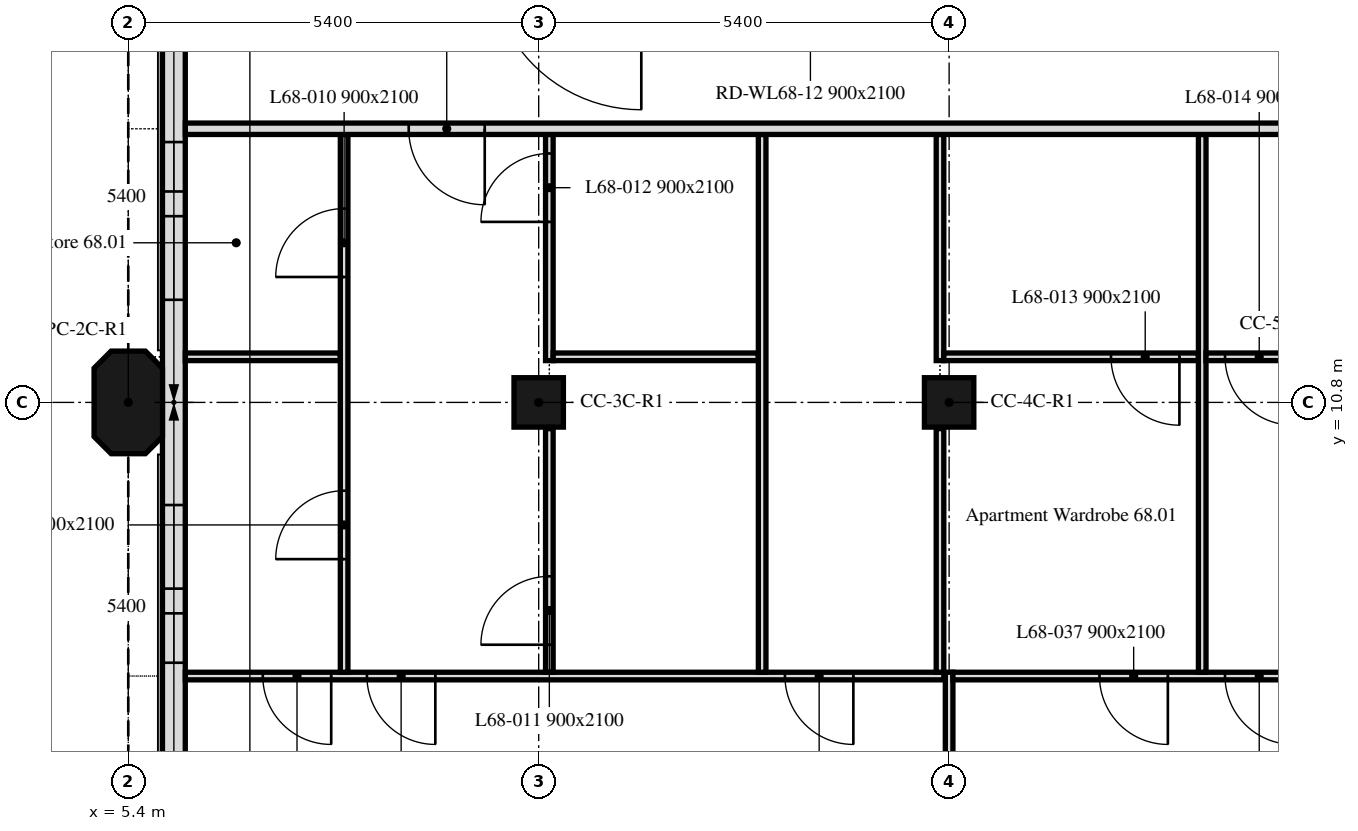
"""IFC4 building model, lengths in metres.
Left out: names, types, materials, properties, quantities, classifications, styles, units other than length and angle.
Written with IfcOpenShell. Run it as: python <this file> out.ifc"""

import sys

from ifc_helpers import new_model, si_unit, direction, frame, frame_2d, origin, origin_2d, place, context, subcontext, project, spatial, polyline, rectangle, outline, extrude, element, fill, save


model = new_model("IFC4")
c1 = context("Model", 3, precision=1e-05, world=origin(), true_north=direction((0.0, 1.0)))
c2 = subcontext(c1, "Body", "Model", "MODEL_VIEW")
j1 = project(units=[si_unit("LENGTHUNIT", "METRE"), si_unit("PLANEANGLEUNIT", "RADIAN")], contexts=[c1])
p1 = place(None, origin())
s1 = spatial("IfcSite", under=j1, at=p1, CompositionType="ELEMENT")
p2 = place(p1, origin())
s2 = spatial("IfcBuilding", under=s1, at=p2, CompositionType="ELEMENT")
p3 = place(p2, frame((0.0, 0.0, 278.5)))
s3 = spatial("IfcBuildingStorey", under=s2, at=p3, CompositionType="ELEMENT", Elevation=278.5)
p4 = place(p3, frame((5.4, 10.8, 0.0), z_axis=(0.0, 0.0, 1.0), x_axis=(0.0, 1.0, 0.0)))
e1 = element("IfcColumn", 1, at=p4, inside=s3, PredefinedType="COLUMN", context=c2, shape_type="SweptSolid", body=[
    extrude(outline(polyline([(-0.45, -0.45), (0.45, -0.45), (0.675, -0.225), (0.675, 0.225), (0.45, 0.45), (-0.45, 0.45), (-0.675, 0.225), (-0.675, -0.225), (-0.45, -0.45)])), origin(), (0.0, 0.0, 1.0), 3.0),
])
for number, where, z_axis, x_axis in (
    (2, (10.8, 10.8, 0.0), (0.0, 0.0, 1.0), (1.0, 0.0, 0.0)),
    (3, (16.2, 10.8, 0.0), (0.0, 0.0, 1.0), (1.0, 0.0, 0.0)),
):
    element("IfcColumn", number, at=place(p3, frame(where, z_axis=z_axis, x_axis=x_axis)), inside=s3, PredefinedType="COLUMN", context=c2, shape_type="SweptSolid", body=[
        extrude(rectangle(XDim=0.65, YDim=0.65, at=origin_2d()), origin(), (0.0, 0.0, 1.0), 3.0),
    ])
p5 = place(p3, frame((6.0, 16.2, 0.0), z_axis=(0.0, 0.0, 1.0), x_axis=(0.0, -1.0, 0.0)))
e4 = element("IfcWall", 4, at=p5, inside=s3, PredefinedType="SOLIDWALL", context=c2, shape_type="SweptSolid", body=[
    extrude(rectangle(XDim=10.614, YDim=0.3, at=frame_2d((5.307, 0.0))), origin(), (0.0, 0.0, 1.0), 3.0),
])
p6 = place(p5, frame((1.975, 0.0, 0.9)))
e5 = element("IfcOpeningElement", 5, at=p6, cuts=e4, PredefinedType="OPENING", context=c2, shape_type="SweptSolid", body=[
    extrude(rectangle(XDim=0.65, YDim=1.7, at=frame_2d((0.325, 0.85))), frame((0.0, 0.16, 0.0), z_axis=(0.0, -1.0, 0.0), x_axis=(1.0, 0.0, 0.0)), (0.0, 0.0, 1.0), 0.32),
])
p7 = place(p5, frame((2.95, 0.0, 0.9)))
e6 = element("IfcOpeningElement", 6, at=p7, cuts=e4, PredefinedType="OPENING", context=c2, shape_type="SweptSolid", body=[
    extrude(rectangle(XDim=1.1, YDim=1.7, at=frame_2d((0.55, 0.85))), frame((0.0, 0.16, 0.0), z_axis=(0.0, -1.0, 0.0), x_axis=(1.0, 0.0, 0.0)), (0.0, 0.0, 1.0), 0.32),
])
p8 = place(p5, frame((6.75, 0.0, 0.9)))
e7 = element("IfcOpeningElement", 7, at=p8, cuts=e4, PredefinedType="OPENING", context=c2, shape_type="SweptSolid", body=[
    extrude(rectangle(XDim=1.1, YDim=1.7, at=frame_2d((0.55, 0.85))), frame((0.0, 0.16, 0.0), z_axis=(0.0, -1.0, 0.0), x_axis=(1.0, 0.0, 0.0)), (0.0, 0.0, 1.0), 0.32),
])
p9 = place(p5, frame((8.175, 0.0, 0.9)))
e8 = element("IfcOpeningElement", 8, at=p9, cuts=e4, PredefinedType="OPENING", context=c2, shape_type="SweptSolid", body=[
    extrude(rectangle(XDim=0.65, YDim=1.7, at=frame_2d((0.325, 0.85))), frame((0.0, 0.16, 0.0), z_axis=(0.0, -1.0, 0.0), x_axis=(1.0, 0.0, 0.0)), (0.0, 0.0, 1.0), 0.32),
])
p10 = place(p3, frame((16.2, 5.745, 0.0), z_axis=(0.0, 0.0, 1.0), x_axis=(0.0, 1.0, 0.0)))
e9 = element("IfcWall", 9, at=p10, inside=s3, PredefinedType="PARTITIONING", context=c2, shape_type="SweptSolid", body=[
    extrude(rectangle(XDim=1.505, YDim=0.1, at=frame_2d((0.752, 0.0))), origin(), (0.0, 0.0, 1.0), 2.4),
])
p11 = place(p3, frame((16.13, 7.2, 0.0), z_axis=(0.0, 0.0, 1.0), x_axis=(-1.0, 0.0, 0.0)))
e10 = element("IfcWall", 10, at=p11, inside=s3, PredefinedType="PARTITIONING", context=c2, shape_type="SweptSolid", body=[
    extrude(rectangle(XDim=9.979, YDim=0.1, at=frame_2d((4.99, 0.0))), origin(), (0.0, 0.0, 1.0), 3.0),
])
p12 = place(p11, frame((1.19, 0.0, 0.0)))
e11 = element("IfcOpeningElement", 11, at=p12, cuts=e10, PredefinedType="OPENING", context=c2, shape_type="SweptSolid", body=[
    extrude(rectangle(XDim=0.9, YDim=2.1, at=frame_2d((0.45, 1.05))), frame((0.0, 0.05, 0.0), z_axis=(0.0, -1.0, 0.0), x_axis=(1.0, 0.0, 0.0)), (0.0, 0.0, 1.0), 0.1),
])
p13 = place(p11, frame((8.06, 0.0, 0.0)))
e12 = element("IfcOpeningElement", 12, at=p13, cuts=e10, PredefinedType="OPENING", context=c2, shape_type="SweptSolid", body=[
    extrude(rectangle(XDim=0.9, YDim=2.1, at=frame_2d((0.45, 1.05))), frame((0.0, 0.05, 0.0), z_axis=(0.0, -1.0, 0.0), x_axis=(1.0, 0.0, 0.0)), (0.0, 0.0, 1.0), 0.1),
])
p14 = place(p11, frame((6.69, 0.0, 0.0)))
e13 = element("IfcOpeningElement", 13, at=p14, cuts=e10, PredefinedType="OPENING", context=c2, shape_type="SweptSolid", body=[
    extrude(rectangle(XDim=0.9, YDim=2.1, at=frame_2d((0.45, 1.05))), frame((0.0, 0.05, 0.0), z_axis=(0.0, -1.0, 0.0), x_axis=(1.0, 0.0, 0.0)), (0.0, 0.0, 1.0), 0.1),
])
p15 = place(p3, frame((21.525, 7.2, 0.0), z_axis=(0.0, 0.0, 1.0), x_axis=(-1.0, 0.0, 0.0)))
e14 = element("IfcWall", 14, at=p15, inside=s3, PredefinedType="PARTITIONING", context=c2, shape_type="SweptSolid", body=[
    extrude(rectangle(XDim=5.275, YDim=0.1, at=frame_2d((2.637, 0.0))), origin(), (0.0, 0.0, 1.0), 3.0),
])
p16 = place(p15, frame((2.447, 0.0, 0.0)))
e15 = element("IfcOpeningElement", 15, at=p16, cuts=e14, PredefinedType="OPENING", context=c2, shape_type="SweptSolid", body=[
    extrude(rectangle(XDim=0.9, YDim=2.1, at=frame_2d((0.45, 1.05))), frame((0.0, 0.05, 0.0), z_axis=(0.0, -1.0, 0.0), x_axis=(1.0, 0.0, 0.0)), (0.0, 0.0, 1.0), 0.1),
])
p17 = place(p15, frame((0.795, 0.0, 0.0)))
e16 = element("IfcOpeningElement", 16, at=p17, cuts=e14, PredefinedType="OPENING", context=c2, shape_type="SweptSolid", body=[
    extrude(rectangle(XDim=0.9, YDim=2.1, at=frame_2d((0.45, 1.05))), frame((0.0, 0.05, 0.0), z_axis=(0.0, -1.0, 0.0), x_axis=(1.0, 0.0, 0.0)), (0.0, 0.0, 1.0), 0.1),
])
p18 = place(p3, frame((8.19, 11.4, 0.0), z_axis=(0.0, 0.0, 1.0), x_axis=(-1.0, 0.0, 0.0)))
e17 = element("IfcWall", 17, at=p18, inside=s3, PredefinedType="PARTITIONING", context=c2, shape_type="SweptSolid", body=[
    extrude(rectangle(XDim=2.039, YDim=0.1, at=frame_2d((1.02, 0.0))), origin(), (0.0, 0.0, 1.0), 3.0),
])
p19 = place(p3, frame((8.24, 7.25, 0.0), z_axis=(0.0, 0.0, 1.0), x_axis=(0.0, 1.0, 0.0)))
e18 = element("IfcWall", 18, at=p19, inside=s3, PredefinedType="PARTITIONING", context=c2, shape_type="SweptSolid", body=[
    extrude(rectangle(XDim=7.075, YDim=0.1, at=frame_2d((3.538, 0.0))), origin(), (0.0, 0.0, 1.0), 3.0),
])
p20 = place(p19, frame((5.2, 0.0, 0.0)))
e19 = element("IfcOpeningElement", 19, at=p20, cuts=e18, PredefinedType="OPENING", context=c2, shape_type="SweptSolid", body=[
    extrude(rectangle(XDim=0.9, YDim=2.1, at=frame_2d((0.45, 1.05))), frame((0.0, 0.05, 0.0), z_axis=(0.0, -1.0, 0.0), x_axis=(1.0, 0.0, 0.0)), (0.0, 0.0, 1.0), 0.1),
])
p21 = place(p19, frame((1.488, 0.0, 0.0)))
e20 = element("IfcOpeningElement", 20, at=p21, cuts=e18, PredefinedType="OPENING", context=c2, shape_type="SweptSolid", body=[
    extrude(rectangle(XDim=0.9, YDim=2.1, at=frame_2d((0.45, 1.05))), frame((0.0, 0.05, 0.0), z_axis=(0.0, -1.0, 0.0), x_axis=(1.0, 0.0, 0.0)), (0.0, 0.0, 1.0), 0.1),
])
p22 = place(p3, frame((10.94, 7.25, 0.0), z_axis=(0.0, 0.0, 1.0), x_axis=(0.0, 1.0, 0.0)))
e21 = element("IfcWall", 21, at=p22, inside=s3, PredefinedType="PARTITIONING", context=c2, shape_type="SweptSolid", body=[
    extrude(rectangle(XDim=3.205, YDim=0.1, at=frame_2d((1.603, 0.0))), origin(), (0.0, 0.0, 1.0), 3.0),
])
p23 = place(p22, frame((0.362, 0.0, 0.0)))
e22 = element("IfcOpeningElement", 22, at=p23, cuts=e21, PredefinedType="OPENING", context=c2, shape_type="SweptSolid", body=[
    extrude(rectangle(XDim=0.9, YDim=2.1, at=frame_2d((0.45, 1.05))), frame((0.0, 0.05, 0.0), z_axis=(0.0, -1.0, 0.0), x_axis=(1.0, 0.0, 0.0)), (0.0, 0.0, 1.0), 0.1),
])
p24 = place(p3, frame((10.94, 11.35, 0.0), z_axis=(0.0, 0.0, 1.0), x_axis=(0.0, 1.0, 0.0)))
e23 = element("IfcWall", 23, at=p24, inside=s3, PredefinedType="PARTITIONING", context=c2, shape_type="SweptSolid", body=[
    extrude(rectangle(XDim=2.975, YDim=0.1, at=frame_2d((1.487, 0.0))), origin(), (0.0, 0.0, 1.0), 3.0),
])
p25 = place(p24, frame((1.825, 0.0, 0.0)))
e24 = element("IfcOpeningElement", 24, at=p25, cuts=e23, PredefinedType="OPENING", context=c2, shape_type="SweptSolid", body=[
    extrude(rectangle(XDim=0.9, YDim=2.1, at=frame_2d((0.45, 1.05))), frame((0.0, 0.05, 0.0), z_axis=(0.0, -1.0, 0.0), x_axis=(1.0, 0.0, 0.0)), (0.0, 0.0, 1.0), 0.1),
])
p26 = place(p3, frame((13.69, 11.4, 0.0), z_axis=(0.0, 0.0, 1.0), x_axis=(-1.0, 0.0, 0.0)))
e25 = element("IfcWall", 25, at=p26, inside=s3, PredefinedType="PARTITIONING", context=c2, shape_type="SweptSolid", body=[
    extrude(rectangle(XDim=2.7, YDim=0.1, at=frame_2d((1.35, 0.0))), origin(), (0.0, 0.0, 1.0), 3.0),
])
p27 = place(p3, frame((13.74, 7.25, 0.0), z_axis=(0.0, 0.0, 1.0), x_axis=(0.0, 1.0, 0.0)))
e26 = element("IfcWall", 26, at=p27, inside=s3, PredefinedType="PARTITIONING", context=c2, shape_type="SweptSolid", body=[
    extrude(rectangle(XDim=7.075, YDim=0.1, at=frame_2d((3.538, 0.0))), origin(), (0.0, 0.0, 1.0), 3.0),
])
p28 = place(p3, frame((16.08, 7.25, 0.0), z_axis=(0.0, 0.0, 1.0), x_axis=(0.0, 1.0, 0.0)))
e27 = element("IfcWall", 27, at=p28, inside=s3, PredefinedType="PARTITIONING", context=c2, shape_type="SweptSolid", body=[
    extrude(rectangle(XDim=3.205, YDim=0.1, at=frame_2d((1.603, 0.0))), origin(), (0.0, 0.0, 1.0), 2.4),
])
p29 = place(p3, frame((16.08, 11.35, 0.0), z_axis=(0.0, 0.0, 1.0), x_axis=(0.0, 1.0, 0.0)))
e28 = element("IfcWall", 28, at=p29, inside=s3, PredefinedType="PARTITIONING", context=c2, shape_type="SweptSolid", body=[
    extrude(rectangle(XDim=2.975, YDim=0.1, at=frame_2d((1.487, 0.0))), origin(), (0.0, 0.0, 1.0), 2.4),
])
p30 = place(p3, frame((19.48, 11.4, 0.0), z_axis=(0.0, 0.0, 1.0), x_axis=(-1.0, 0.0, 0.0)))
e29 = element("IfcWall", 29, at=p30, inside=s3, PredefinedType="PARTITIONING", context=c2, shape_type="SweptSolid", body=[
    extrude(rectangle(XDim=3.35, YDim=0.1, at=frame_2d((1.675, 0.0))), origin(), (0.0, 0.0, 1.0), 3.0),
])
p31 = place(p30, frame((0.25, 0.0, 0.0)))
e30 = element("IfcOpeningElement", 30, at=p31, cuts=e29, PredefinedType="OPENING", context=c2, shape_type="SweptSolid", body=[
    extrude(rectangle(XDim=0.9, YDim=2.1, at=frame_2d((0.45, 1.05))), frame((0.0, 0.05, 0.0), z_axis=(0.0, -1.0, 0.0), x_axis=(1.0, 0.0, 0.0)), (0.0, 0.0, 1.0), 0.1),
])
p32 = place(p3, frame((19.53, 7.25, 0.0), z_axis=(0.0, 0.0, 1.0), x_axis=(0.0, 1.0, 0.0)))
e31 = element("IfcWall", 31, at=p32, inside=s3, PredefinedType="PARTITIONING", context=c2, shape_type="SweptSolid", body=[
    extrude(rectangle(XDim=7.075, YDim=0.1, at=frame_2d((3.538, 0.0))), origin(), (0.0, 0.0, 1.0), 3.0),
])
p33 = place(p3, frame((23.221, 11.4, 0.0), z_axis=(0.0, 0.0, 1.0), x_axis=(-1.0, 0.0, 0.0)))
e32 = element("IfcWall", 32, at=p33, inside=s3, PredefinedType="PARTITIONING", context=c2, shape_type="SweptSolid", body=[
    extrude(rectangle(XDim=3.641, YDim=0.1, at=frame_2d((1.82, 0.0))), origin(), (0.0, 0.0, 1.0), 2.4),
])
p34 = place(p33, frame((2.491, 0.0, 0.0)))
e33 = element("IfcOpeningElement", 33, at=p34, cuts=e32, PredefinedType="OPENING", context=c2, shape_type="SweptSolid", body=[
    extrude(rectangle(XDim=0.9, YDim=2.1, at=frame_2d((0.45, 1.05))), frame((0.0, 0.05, 0.0), z_axis=(0.0, -1.0, 0.0), x_axis=(1.0, 0.0, 0.0)), (0.0, 0.0, 1.0), 0.1),
])
p35 = place(p3, frame((47.849, 14.4, 0.0), z_axis=(0.0, 0.0, 1.0), x_axis=(-1.0, 0.0, 0.0)))
e34 = element("IfcWall", 34, at=p35, inside=s3, PredefinedType="PARTITIONING", context=c2, shape_type="SweptSolid", body=[
    extrude(rectangle(XDim=41.698, YDim=0.15, at=frame_2d((20.849, 0.0))), origin(), (0.0, 0.0, 1.0), 2.4),
])
p36 = place(p35, frame((10.881, 0.0, 0.0)))
e35 = element("IfcOpeningElement", 35, at=p36, cuts=e34, PredefinedType="OPENING", context=c2, shape_type="SweptSolid", body=[
    extrude(rectangle(XDim=1.0, YDim=2.1, at=frame_2d((0.5, 1.05))), frame((0.0, 0.075, 0.0), z_axis=(0.0, -1.0, 0.0), x_axis=(1.0, 0.0, 0.0)), (0.0, 0.0, 1.0), 0.15),
])
p37 = place(p35, frame((37.759, 0.0, 0.0)))
e36 = element("IfcOpeningElement", 36, at=p37, cuts=e34, PredefinedType="OPENING", context=c2, shape_type="SweptSolid", body=[
    extrude(rectangle(XDim=1.0, YDim=2.1, at=frame_2d((0.5, 1.05))), frame((0.0, 0.075, 0.0), z_axis=(0.0, -1.0, 0.0), x_axis=(1.0, 0.0, 0.0)), (0.0, 0.0, 1.0), 0.15),
])
p38 = place(p35, frame((22.815, 0.0, 0.0)))
e37 = element("IfcOpeningElement", 37, at=p38, cuts=e34, PredefinedType="OPENING", context=c2, shape_type="SweptSolid", body=[
    extrude(rectangle(XDim=1.0, YDim=2.1, at=frame_2d((0.5, 1.05))), frame((0.0, 0.075, 0.0), z_axis=(0.0, -1.0, 0.0), x_axis=(1.0, 0.0, 0.0)), (0.0, 0.0, 1.0), 0.15),
])
p39 = place(p35, frame((4.85, 0.0, 0.0)))
e38 = element("IfcOpeningElement", 38, at=p39, cuts=e34, PredefinedType="OPENING", context=c2, shape_type="SweptSolid", body=[
    extrude(rectangle(XDim=1.0, YDim=2.1, at=frame_2d((0.5, 1.05))), frame((0.0, 0.075, 0.0), z_axis=(0.0, -1.0, 0.0), x_axis=(1.0, 0.0, 0.0)), (0.0, 0.0, 1.0), 0.15),
])
p40 = place(p6, origin())
e39 = element("IfcWindow", 39, at=p40, inside=s3, PartitioningType="SINGLE_PANEL", PredefinedType="WINDOW", context=c2, shape_type="SweptSolid", body=[
    extrude(rectangle(XDim=0.65, YDim=1.7, at=frame_2d((0.325, 0.85))), frame((0.0, 0.03, 0.0), z_axis=(0.0, -1.0, 0.0), x_axis=(1.0, 0.0, 0.0)), (0.0, 0.0, 1.0), 0.06),
])
fill(e5, e39)
p41 = place(p7, origin())
e40 = element("IfcWindow", 40, at=p41, inside=s3, PartitioningType="SINGLE_PANEL", PredefinedType="WINDOW", context=c2, shape_type="SweptSolid", body=[
    extrude(rectangle(XDim=1.1, YDim=1.7, at=frame_2d((0.55, 0.85))), frame((0.0, 0.03, 0.0), z_axis=(0.0, -1.0, 0.0), x_axis=(1.0, 0.0, 0.0)), (0.0, 0.0, 1.0), 0.06),
])
fill(e6, e40)
p42 = place(p8, origin())
e41 = element("IfcWindow", 41, at=p42, inside=s3, PartitioningType="SINGLE_PANEL", PredefinedType="WINDOW", context=c2, shape_type="SweptSolid", body=[
    extrude(rectangle(XDim=1.1, YDim=1.7, at=frame_2d((0.55, 0.85))), frame((0.0, 0.03, 0.0), z_axis=(0.0, -1.0, 0.0), x_axis=(1.0, 0.0, 0.0)), (0.0, 0.0, 1.0), 0.06),
])
fill(e7, e41)
p43 = place(p9, origin())
e42 = element("IfcWindow", 42, at=p43, inside=s3, PartitioningType="SINGLE_PANEL", PredefinedType="WINDOW", context=c2, shape_type="SweptSolid", body=[
    extrude(rectangle(XDim=0.65, YDim=1.7, at=frame_2d((0.325, 0.85))), frame((0.0, 0.03, 0.0), z_axis=(0.0, -1.0, 0.0), x_axis=(1.0, 0.0, 0.0)), (0.0, 0.0, 1.0), 0.06),
])
fill(e8, e42)
p44 = place(p12, origin())
e43 = element("IfcDoor", 43, at=p44, inside=s3, OperationType="SINGLE_SWING_LEFT", PredefinedType="DOOR", context=c2, shape_type="SweptSolid", body=[
    extrude(rectangle(XDim=0.9, YDim=2.1, at=frame_2d((0.45, 1.05))), frame((0.0, 0.025, 0.0), z_axis=(0.0, -1.0, 0.0), x_axis=(1.0, 0.0, 0.0)), (0.0, 0.0, 1.0), 0.05),
])
fill(e11, e43)
p45 = place(p20, origin())
e44 = element("IfcDoor", 44, at=p45, inside=s3, OperationType="SINGLE_SWING_RIGHT", PredefinedType="DOOR", context=c2, shape_type="SweptSolid", body=[
    extrude(rectangle(XDim=0.9, YDim=2.1, at=frame_2d((0.45, 1.05))), frame((0.0, 0.025, 0.0), z_axis=(0.0, -1.0, 0.0), x_axis=(1.0, 0.0, 0.0)), (0.0, 0.0, 1.0), 0.05),
])
fill(e19, e44)
p46 = place(p23, origin())
e45 = element("IfcDoor", 45, at=p46, inside=s3, OperationType="SINGLE_SWING_LEFT", PredefinedType="DOOR", context=c2, shape_type="SweptSolid", body=[
    extrude(rectangle(XDim=0.9, YDim=2.1, at=frame_2d((0.45, 1.05))), frame((0.0, 0.025, 0.0), z_axis=(0.0, -1.0, 0.0), x_axis=(1.0, 0.0, 0.0)), (0.0, 0.0, 1.0), 0.05),
])
fill(e22, e45)
p47 = place(p25, origin())
e46 = element("IfcDoor", 46, at=p47, inside=s3, OperationType="SINGLE_SWING_LEFT", PredefinedType="DOOR", context=c2, shape_type="SweptSolid", body=[
    extrude(rectangle(XDim=0.9, YDim=2.1, at=frame_2d((0.45, 1.05))), frame((0.0, 0.025, 0.0), z_axis=(0.0, -1.0, 0.0), x_axis=(1.0, 0.0, 0.0)), (0.0, 0.0, 1.0), 0.05),
])
fill(e24, e46)
p48 = place(p31, origin())
e47 = element("IfcDoor", 47, at=p48, inside=s3, OperationType="SINGLE_SWING_RIGHT", PredefinedType="DOOR", context=c2, shape_type="SweptSolid", body=[
    extrude(rectangle(XDim=0.9, YDim=2.1, at=frame_2d((0.45, 1.05))), frame((0.0, 0.025, 0.0), z_axis=(0.0, -1.0, 0.0), x_axis=(1.0, 0.0, 0.0)), (0.0, 0.0, 1.0), 0.05),
])
fill(e30, e47)
p49 = place(p34, origin())
e48 = element("IfcDoor", 48, at=p49, inside=s3, OperationType="SINGLE_SWING_RIGHT", PredefinedType="DOOR", context=c2, shape_type="SweptSolid", body=[
    extrude(rectangle(XDim=0.9, YDim=2.1, at=frame_2d((0.45, 1.05))), frame((0.0, 0.025, 0.0), z_axis=(0.0, -1.0, 0.0), x_axis=(1.0, 0.0, 0.0)), (0.0, 0.0, 1.0), 0.05),
])
fill(e33, e48)
p50 = place(p13, origin())
e49 = element("IfcDoor", 49, at=p50, inside=s3, OperationType="SINGLE_SWING_RIGHT", PredefinedType="DOOR", context=c2, shape_type="SweptSolid", body=[
    extrude(rectangle(XDim=0.9, YDim=2.1, at=frame_2d((0.45, 1.05))), frame((0.0, 0.025, 0.0), z_axis=(0.0, -1.0, 0.0), x_axis=(1.0, 0.0, 0.0)), (0.0, 0.0, 1.0), 0.05),
])
fill(e12, e49)
p51 = place(p16, origin())
e50 = element("IfcDoor", 50, at=p51, inside=s3, OperationType="SINGLE_SWING_RIGHT", PredefinedType="DOOR", context=c2, shape_type="SweptSolid", body=[
    extrude(rectangle(XDim=0.9, YDim=2.1, at=frame_2d((0.45, 1.05))), frame((0.0, 0.025, 0.0), z_axis=(0.0, -1.0, 0.0), x_axis=(1.0, 0.0, 0.0)), (0.0, 0.0, 1.0), 0.05),
])
fill(e15, e50)
p52 = place(p17, origin())
e51 = element("IfcDoor", 51, at=p52, inside=s3, OperationType="SINGLE_SWING_LEFT", PredefinedType="DOOR", context=c2, shape_type="SweptSolid", body=[
    extrude(rectangle(XDim=0.9, YDim=2.1, at=frame_2d((0.45, 1.05))), frame((0.0, 0.025, 0.0), z_axis=(0.0, -1.0, 0.0), x_axis=(1.0, 0.0, 0.0)), (0.0, 0.0, 1.0), 0.05),
])
fill(e16, e51)
p53 = place(p21, origin())
e52 = element("IfcDoor", 52, at=p53, inside=s3, OperationType="SINGLE_SWING_LEFT", PredefinedType="DOOR", context=c2, shape_type="SweptSolid", body=[
    extrude(rectangle(XDim=0.9, YDim=2.1, at=frame_2d((0.45, 1.05))), frame((0.0, 0.025, 0.0), z_axis=(0.0, -1.0, 0.0), x_axis=(1.0, 0.0, 0.0)), (0.0, 0.0, 1.0), 0.05),
])
fill(e20, e52)
p54 = place(p14, origin())
e53 = element("IfcDoor", 53, at=p54, inside=s3, OperationType="SINGLE_SWING_LEFT", PredefinedType="DOOR", context=c2, shape_type="SweptSolid", body=[
    extrude(rectangle(XDim=0.9, YDim=2.1, at=frame_2d((0.45, 1.05))), frame((0.0, 0.025, 0.0), z_axis=(0.0, -1.0, 0.0), x_axis=(1.0, 0.0, 0.0)), (0.0, 0.0, 1.0), 0.05),
])
fill(e13, e53)
p55 = place(p37, origin())
e54 = element("IfcDoor", 54, at=p55, inside=s3, OperationType="SINGLE_SWING_LEFT", PredefinedType="DOOR", context=c2, shape_type="SweptSolid", body=[
    extrude(rectangle(XDim=1.0, YDim=2.1, at=frame_2d((0.5, 1.05))), frame((0.0, 0.025, 0.0), z_axis=(0.0, -1.0, 0.0), x_axis=(1.0, 0.0, 0.0)), (0.0, 0.0, 1.0), 0.05),
])
fill(e36, e54)
save(model, sys.argv[1])
